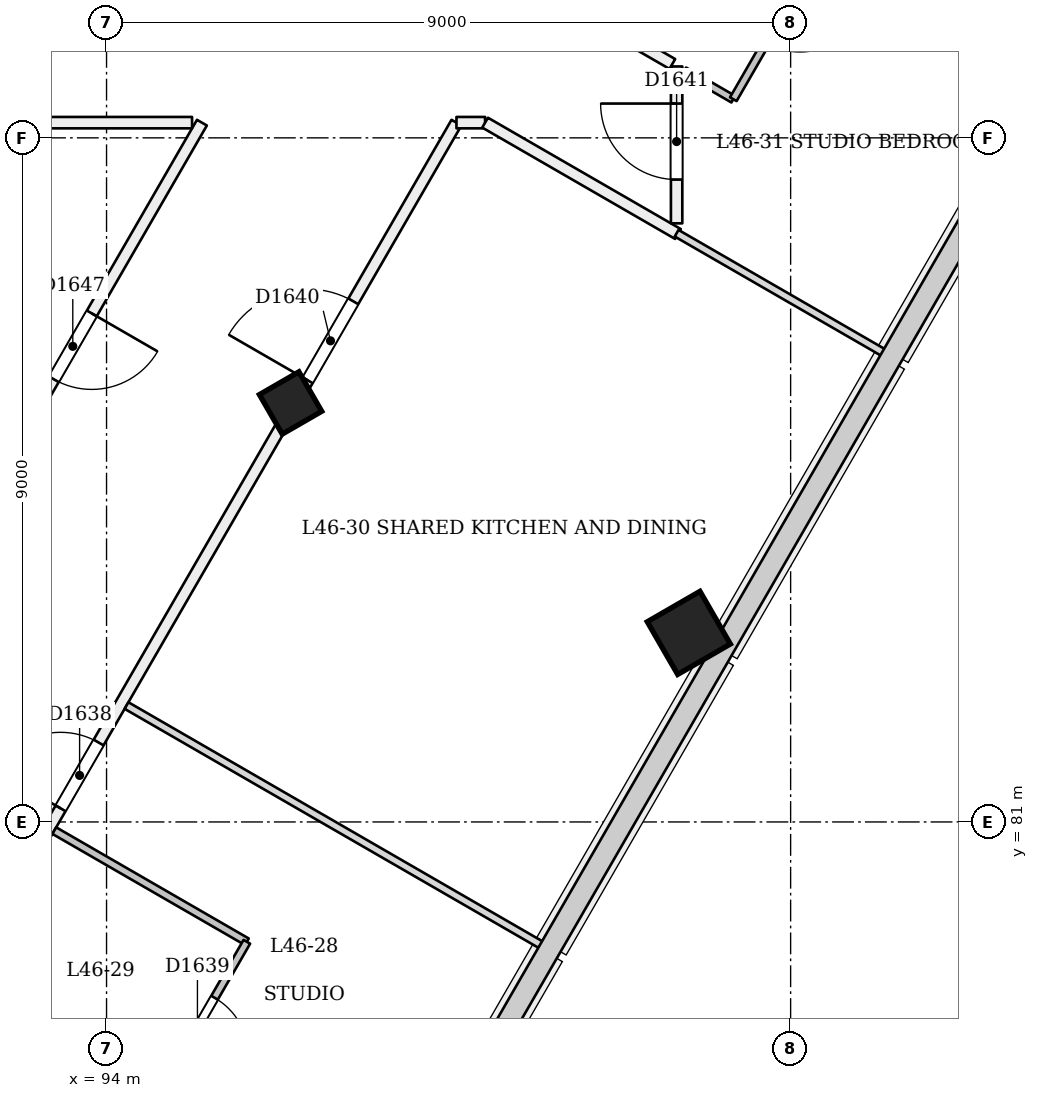
"""IFC4 building model, lengths in metres.
Left out: names, types, materials, properties, quantities, classifications, styles, units other than length and angle.
Written with IfcOpenShell. Run it as: python <this file> out.ifc"""

import sys

from ifc_helpers import new_model, si_unit, direction, frame, frame_2d, origin, origin_2d, place, context, subcontext, project, spatial, rectangle, extrude, element, fill, save


model = new_model("IFC4")
c1 = context("Model", 3, precision=1e-05, world=origin(), true_north=direction((0.0, 1.0)))
c2 = subcontext(c1, "Body", "Model", "MODEL_VIEW")
j1 = project(units=[si_unit("LENGTHUNIT", "METRE"), si_unit("PLANEANGLEUNIT", "RADIAN")], contexts=[c1])
p1 = place(None, origin())
s1 = spatial("IfcSite", under=j1, at=p1, CompositionType="ELEMENT")
p2 = place(p1, origin())
s2 = spatial("IfcBuilding", under=s1, at=p2, CompositionType="ELEMENT")
p3 = place(p2, frame((0.0, 0.0, 178.2)))
s3 = spatial("IfcBuildingStorey", under=s2, at=p3, CompositionType="ELEMENT", Elevation=178.2)
p4 = place(p3, frame((96.448, 86.465, -0.018), z_axis=(-0.022222852987, 0.038483477124, 0.999012095419), x_axis=(-0.500174626395, -0.865639439229, 0.022219459073)))
e1 = element("IfcColumn", 1, at=p4, inside=s3, PredefinedType="COLUMN", context=c2, shape_type="SweptSolid", body=[
    extrude(rectangle(XDim=0.6, YDim=0.6, at=origin_2d()), origin(), (0.0, 0.0, 1.0), 3.604),
])
p5 = place(p3, frame((101.688, 83.44, -0.024), z_axis=(-0.02215519141, 0.038415882353, 0.999016199807), x_axis=(-0.500657429676, -0.865361475843, 0.022173277538)))
e2 = element("IfcColumn", 2, at=p5, inside=s3, PredefinedType="COLUMN", context=c2, shape_type="SweptSolid", body=[
    extrude(rectangle(XDim=0.8, YDim=0.8, at=origin_2d()), origin(), (0.0, 0.0, 1.0), 3.604),
])
p6 = place(p3, frame((95.255, 90.2, 0.0), z_axis=(0.0, 0.0, 1.0), x_axis=(-0.499996558816, -0.866027390544, 0.0)))
e3 = element("IfcWall", 3, at=p6, inside=s3, PredefinedType="PARTITIONING", context=c2, shape_type="SweptSolid", body=[
    extrude(rectangle(XDim=20.38, YDim=0.15, at=frame_2d((10.19, 0.0))), origin(), (0.0, 0.0, 1.0), 3.15),
])
p7 = place(p6, frame((11.902, 0.0, 0.0)))
e4 = element("IfcOpeningElement", 4, at=p7, cuts=e3, PredefinedType="OPENING", context=c2, shape_type="SweptSolid", body=[
    extrude(rectangle(XDim=0.9, YDim=2.1, at=frame_2d((0.45, 1.05))), frame((0.0, 0.085, 0.0), z_axis=(0.0, -1.0, 0.0), x_axis=(1.0, 0.0, 0.0)), (0.0, 0.0, 1.0), 0.171),
])
p8 = place(p6, frame((7.233, 0.0, 0.0)))
e5 = element("IfcOpeningElement", 5, at=p8, cuts=e3, PredefinedType="OPENING", context=c2, shape_type="SweptSolid", body=[
    extrude(rectangle(XDim=1.0, YDim=2.1, at=frame_2d((0.5, 1.05))), frame((0.0, 0.085, 0.0), z_axis=(0.0, -1.0, 0.0), x_axis=(1.0, 0.0, 0.0)), (0.0, 0.0, 1.0), 0.171),
])
p9 = place(p6, frame((2.898, 0.0, 0.0)))
e6 = element("IfcOpeningElement", 6, at=p9, cuts=e3, PredefinedType="OPENING", context=c2, shape_type="SweptSolid", body=[
    extrude(rectangle(XDim=1.0, YDim=2.1, at=frame_2d((0.5, 1.05))), frame((0.0, 0.085, 0.0), z_axis=(0.0, -1.0, 0.0), x_axis=(1.0, 0.0, 0.0)), (0.0, 0.0, 1.0), 0.171),
])
p10 = place(p3, frame((85.0, 66.638, 0.0), z_axis=(0.0, 0.0, 1.0), x_axis=(0.499999498748, 0.866025693182, 0.0)))
e7 = element("IfcWall", 7, at=p10, inside=s3, PredefinedType="PARTITIONING", context=c2, shape_type="SweptSolid", body=[
    extrude(rectangle(XDim=27.207, YDim=0.15, at=frame_2d((13.604, 0.0))), origin(), (0.0, 0.0, 1.0), 2.75),
])
p11 = place(p10, frame((1.0, 0.0, 0.0)))
e8 = element("IfcOpeningElement", 8, at=p11, cuts=e7, PredefinedType="OPENING", context=c2, shape_type="SweptSolid", body=[
    extrude(rectangle(XDim=1.0, YDim=2.1, at=frame_2d((0.5, 1.05))), frame((0.0, 0.085, 0.0), z_axis=(0.0, -1.0, 0.0), x_axis=(1.0, 0.0, 0.0)), (0.0, 0.0, 1.0), 0.171),
])
p12 = place(p10, frame((7.791, 0.0, 0.0)))
e9 = element("IfcOpeningElement", 9, at=p12, cuts=e7, PredefinedType="OPENING", context=c2, shape_type="SweptSolid", body=[
    extrude(rectangle(XDim=1.0, YDim=2.1, at=frame_2d((0.5, 1.05))), frame((0.0, 0.085, 0.0), z_axis=(0.0, -1.0, 0.0), x_axis=(1.0, 0.0, 0.0)), (0.0, 0.0, 1.0), 0.171),
])
p13 = place(p10, frame((10.0, 0.0, 0.0)))
e10 = element("IfcOpeningElement", 10, at=p13, cuts=e7, PredefinedType="OPENING", context=c2, shape_type="SweptSolid", body=[
    extrude(rectangle(XDim=1.0, YDim=2.1, at=frame_2d((0.5, 1.05))), frame((0.0, 0.085, 0.0), z_axis=(0.0, -1.0, 0.0), x_axis=(1.0, 0.0, 0.0)), (0.0, 0.0, 1.0), 0.171),
])
p14 = place(p10, frame((16.791, 0.0, 0.0)))
e11 = element("IfcOpeningElement", 11, at=p14, cuts=e7, PredefinedType="OPENING", context=c2, shape_type="SweptSolid", body=[
    extrude(rectangle(XDim=1.0, YDim=2.1, at=frame_2d((0.5, 1.05))), frame((0.0, 0.085, 0.0), z_axis=(0.0, -1.0, 0.0), x_axis=(1.0, 0.0, 0.0)), (0.0, 0.0, 1.0), 0.171),
])
p15 = place(p10, frame((23.293, 0.0, 0.0)))
e12 = element("IfcOpeningElement", 12, at=p15, cuts=e7, PredefinedType="OPENING", context=c2, shape_type="SweptSolid", body=[
    extrude(rectangle(XDim=1.2, YDim=2.1, at=frame_2d((0.6, 1.05))), frame((0.0, 0.085, 0.0), z_axis=(0.0, -1.0, 0.0), x_axis=(1.0, 0.0, 0.0)), (0.0, 0.0, 1.0), 0.171),
])
p16 = place(p3, frame((98.604, 90.2, 0.0), z_axis=(0.0, 0.0, 1.0), x_axis=(1.0, 0.0, 0.0)))
e13 = element("IfcWall", 13, at=p16, inside=s3, PredefinedType="PARTITIONING", context=c2, shape_type="SweptSolid", body=[
    extrude(rectangle(XDim=0.377, YDim=0.15, at=frame_2d((0.188, 0.0))), origin(), (0.0, 0.0, 1.0), 3.15),
])
p17 = place(p3, frame((98.98, 90.2, 0.0), z_axis=(0.0, 0.0, 1.0), x_axis=(0.866034304969, -0.49998458238, 0.0)))
e14 = element("IfcWall", 14, at=p17, inside=s3, PredefinedType="PARTITIONING", context=c2, shape_type="SweptSolid", body=[
    extrude(rectangle(XDim=2.929, YDim=0.15, at=frame_2d((1.465, 0.0))), origin(), (0.0, 0.0, 1.0), 3.15),
])
p18 = place(p3, frame((101.5, 88.875, 0.0), z_axis=(0.0, 0.0, 1.0), x_axis=(0.0, 1.0, 0.0)))
e15 = element("IfcWall", 15, at=p18, inside=s3, PredefinedType="PARTITIONING", context=c2, shape_type="SweptSolid", body=[
    extrude(rectangle(XDim=2.064, YDim=0.15, at=frame_2d((1.032, 0.0))), origin(), (0.0, 0.0, 1.0), 3.15),
])
p19 = place(p18, frame((0.576, 0.0, 0.0)))
e16 = element("IfcOpeningElement", 16, at=p19, cuts=e15, PredefinedType="OPENING", context=c2, shape_type="SweptSolid", body=[
    extrude(rectangle(XDim=1.0, YDim=2.1, at=frame_2d((0.5, 1.05))), frame((0.0, 0.085, 0.0), z_axis=(0.0, -1.0, 0.0), x_axis=(1.0, 0.0, 0.0)), (0.0, 0.0, 1.0), 0.171),
])
p20 = place(p3, frame((101.444, 90.972, 0.0), z_axis=(0.0, 0.0, 1.0), x_axis=(-0.866042076863, 0.499971120268, 0.0)))
e17 = element("IfcWall", 17, at=p20, inside=s3, PredefinedType="PARTITIONING", context=c2, shape_type="SweptSolid", body=[
    extrude(rectangle(XDim=1.898, YDim=0.15, at=frame_2d((0.949, 0.0))), origin(), (0.0, 0.0, 1.0), 3.15),
])
p21 = place(p3, frame((88.0, 90.2, 0.0), z_axis=(0.0, 0.0, 1.0), x_axis=(1.0, 0.0, 0.0)))
e18 = element("IfcWall", 18, at=p21, inside=s3, PredefinedType="PARTITIONING", context=c2, shape_type="SweptSolid", body=[
    extrude(rectangle(XDim=7.125, YDim=0.15, at=frame_2d((3.562, 0.0))), origin(), (0.0, 0.0, 1.0), 3.15),
])
p22 = place(p3, frame((94.503, 77.197, 0.0), z_axis=(0.0, 0.0, 1.0), x_axis=(-0.866039941686, 0.499974818771, 0.0)))
e19 = element("IfcWall", 19, at=p22, inside=s3, PredefinedType="PARTITIONING", context=c2, shape_type="SweptSolid", body=[
    extrude(rectangle(XDim=2.875, YDim=0.1, at=frame_2d((1.438, 0.0))), origin(), (0.0, 0.0, 1.0), 2.75),
])
p23 = place(p3, frame((93.313, 80.886, 0.0), z_axis=(0.0, 0.0, 1.0), x_axis=(0.866046596414, -0.499963291492, 0.0)))
e20 = element("IfcWall", 20, at=p23, inside=s3, PredefinedType="PARTITIONING", context=c2, shape_type="SweptSolid", body=[
    extrude(rectangle(XDim=2.925, YDim=0.1, at=frame_2d((1.462, 0.0))), origin(), (0.0, 0.0, 1.0), 3.15),
])
p24 = place(p3, frame((95.846, 79.424, 0.0), z_axis=(0.0, 0.0, 1.0), x_axis=(-0.500006934395, -0.866021400173, 0.0)))
e21 = element("IfcWall", 21, at=p24, inside=s3, PredefinedType="PARTITIONING", context=c2, shape_type="SweptSolid", body=[
    extrude(rectangle(XDim=5.2, YDim=0.1, at=frame_2d((2.6, 0.0))), origin(), (0.0, 0.0, 1.0), 2.75),
])
p25 = place(p24, frame((3.45, 0.0, 0.0)))
e22 = element("IfcOpeningElement", 22, at=p25, cuts=e21, PredefinedType="OPENING", context=c2, shape_type="SweptSolid", body=[
    extrude(rectangle(XDim=0.9, YDim=2.1, at=frame_2d((0.45, 1.05))), frame((0.0, 0.061, 0.0), z_axis=(0.0, -1.0, 0.0), x_axis=(1.0, 0.0, 0.0)), (0.0, 0.0, 1.0), 0.121),
])
p26 = place(p24, frame((0.85, 0.0, 0.0)))
e23 = element("IfcOpeningElement", 23, at=p26, cuts=e21, PredefinedType="OPENING", context=c2, shape_type="SweptSolid", body=[
    extrude(rectangle(XDim=0.9, YDim=2.1, at=frame_2d((0.45, 1.05))), frame((0.0, 0.061, 0.0), z_axis=(0.0, -1.0, 0.0), x_axis=(1.0, 0.0, 0.0)), (0.0, 0.0, 1.0), 0.121),
])
p27 = place(p3, frame((99.758, 79.359, 0.0), z_axis=(0.0, 0.0, 1.0), x_axis=(-0.866025401434, 0.500000004071, 0.0)))
e24 = element("IfcWall", 24, at=p27, inside=s3, PredefinedType="PARTITIONING", context=c2, shape_type="SweptSolid", body=[
    extrude(rectangle(XDim=6.345, YDim=0.1, at=frame_2d((3.173, 0.0))), origin(), (0.0, 0.0, 1.0), 2.65),
])
p28 = place(p3, frame((104.258, 87.153, 0.0), z_axis=(0.0, 0.0, 1.0), x_axis=(-0.866017059223, 0.500014452926, 0.0)))
e25 = element("IfcWall", 25, at=p28, inside=s3, PredefinedType="PARTITIONING", context=c2, shape_type="SweptSolid", body=[
    extrude(rectangle(XDim=3.185, YDim=0.1, at=frame_2d((1.592, 0.0))), origin(), (0.0, 0.0, 1.0), 2.65),
])
p29 = place(p3, frame((102.246, 90.509, 0.0), z_axis=(0.0, 0.0, 1.0), x_axis=(-0.865896584481, 0.500223055231, 0.0)))
e26 = element("IfcWall", 26, at=p29, inside=s3, PredefinedType="PARTITIONING", context=c2, shape_type="SweptSolid", body=[
    extrude(rectangle(XDim=0.746, YDim=0.1, at=frame_2d((0.373, 0.0))), origin(), (0.0, 0.0, 1.0), 3.15),
])
p30 = place(p3, frame((106.49, 91.06, 0.0), z_axis=(0.0, 0.0, 1.0), x_axis=(-0.866032680314, 0.499987396469, 0.0)))
e27 = element("IfcWall", 27, at=p30, inside=s3, PredefinedType="PARTITIONING", context=c2, shape_type="SweptSolid", body=[
    extrude(rectangle(XDim=3.35, YDim=0.15, at=frame_2d((1.675, 0.0))), origin(), (0.0, 0.0, 1.0), 2.65),
])
p31 = place(p3, frame((104.846, 95.012, 0.0), z_axis=(0.0, 0.0, 1.0), x_axis=(-0.500006934395, -0.866021400173, 0.0)))
e28 = element("IfcWall", 28, at=p31, inside=s3, PredefinedType="PARTITIONING", context=c2, shape_type="SweptSolid", body=[
    extrude(rectangle(XDim=5.2, YDim=0.1, at=frame_2d((2.6, 0.0))), origin(), (0.0, 0.0, 1.0), 2.75),
])
p32 = place(p31, frame((3.444, 0.0, 0.0)))
e29 = element("IfcOpeningElement", 29, at=p32, cuts=e28, PredefinedType="OPENING", context=c2, shape_type="SweptSolid", body=[
    extrude(rectangle(XDim=0.9, YDim=2.1, at=frame_2d((0.45, 1.05))), frame((0.0, 0.061, 0.0), z_axis=(0.0, -1.0, 0.0), x_axis=(1.0, 0.0, 0.0)), (0.0, 0.0, 1.0), 0.121),
])
p33 = place(p31, frame((0.85, 0.0, 0.0)))
e30 = element("IfcOpeningElement", 30, at=p33, cuts=e28, PredefinedType="OPENING", context=c2, shape_type="SweptSolid", body=[
    extrude(rectangle(XDim=0.9, YDim=2.1, at=frame_2d((0.45, 1.05))), frame((0.0, 0.061, 0.0), z_axis=(0.0, -1.0, 0.0), x_axis=(1.0, 0.0, 0.0)), (0.0, 0.0, 1.0), 0.121),
])
p34 = place(p14, origin())
e31 = element("IfcDoor", 31, at=p34, inside=s3, OperationType="SINGLE_SWING_LEFT", PredefinedType="NOTDEFINED", context=c2, shape_type="SweptSolid", body=[
    extrude(rectangle(XDim=1.0, YDim=2.1, at=frame_2d((0.5, 1.05))), frame((0.0, 0.025, 0.0), z_axis=(0.0, -1.0, 0.0), x_axis=(1.0, 0.0, 0.0)), (0.0, 0.0, 1.0), 0.05),
])
fill(e11, e31)
p35 = place(p26, origin())
e32 = element("IfcDoor", 32, at=p35, inside=s3, OperationType="SINGLE_SWING_RIGHT", PredefinedType="NOTDEFINED", context=c2, shape_type="SweptSolid", body=[
    extrude(rectangle(XDim=0.9, YDim=2.1, at=frame_2d((0.45, 1.05))), frame((0.0, 0.025, 0.0), z_axis=(0.0, -1.0, 0.0), x_axis=(1.0, 0.0, 0.0)), (0.0, 0.0, 1.0), 0.05),
])
fill(e23, e32)
p36 = place(p15, origin())
e33 = element("IfcDoor", 33, at=p36, inside=s3, OperationType="SINGLE_SWING_LEFT", PredefinedType="NOTDEFINED", context=c2, shape_type="SweptSolid", body=[
    extrude(rectangle(XDim=1.2, YDim=2.1, at=frame_2d((0.6, 1.05))), frame((0.0, 0.025, 0.0), z_axis=(0.0, -1.0, 0.0), x_axis=(1.0, 0.0, 0.0)), (0.0, 0.0, 1.0), 0.05),
])
fill(e12, e33)
p37 = place(p19, origin())
e34 = element("IfcDoor", 34, at=p37, inside=s3, OperationType="SINGLE_SWING_RIGHT", PredefinedType="NOTDEFINED", context=c2, shape_type="SweptSolid", body=[
    extrude(rectangle(XDim=1.0, YDim=2.1, at=frame_2d((0.5, 1.05))), frame((0.0, 0.025, 0.0), z_axis=(0.0, -1.0, 0.0), x_axis=(1.0, 0.0, 0.0)), (0.0, 0.0, 1.0), 0.05),
])
fill(e16, e34)
p38 = place(p9, origin())
e35 = element("IfcDoor", 35, at=p38, inside=s3, OperationType="SINGLE_SWING_LEFT", PredefinedType="NOTDEFINED", context=c2, shape_type="SweptSolid", body=[
    extrude(rectangle(XDim=1.0, YDim=2.1, at=frame_2d((0.5, 1.05))), frame((0.0, 0.025, 0.0), z_axis=(0.0, -1.0, 0.0), x_axis=(1.0, 0.0, 0.0)), (0.0, 0.0, 1.0), 0.05),
])
fill(e6, e35)
save(model, sys.argv[1])
